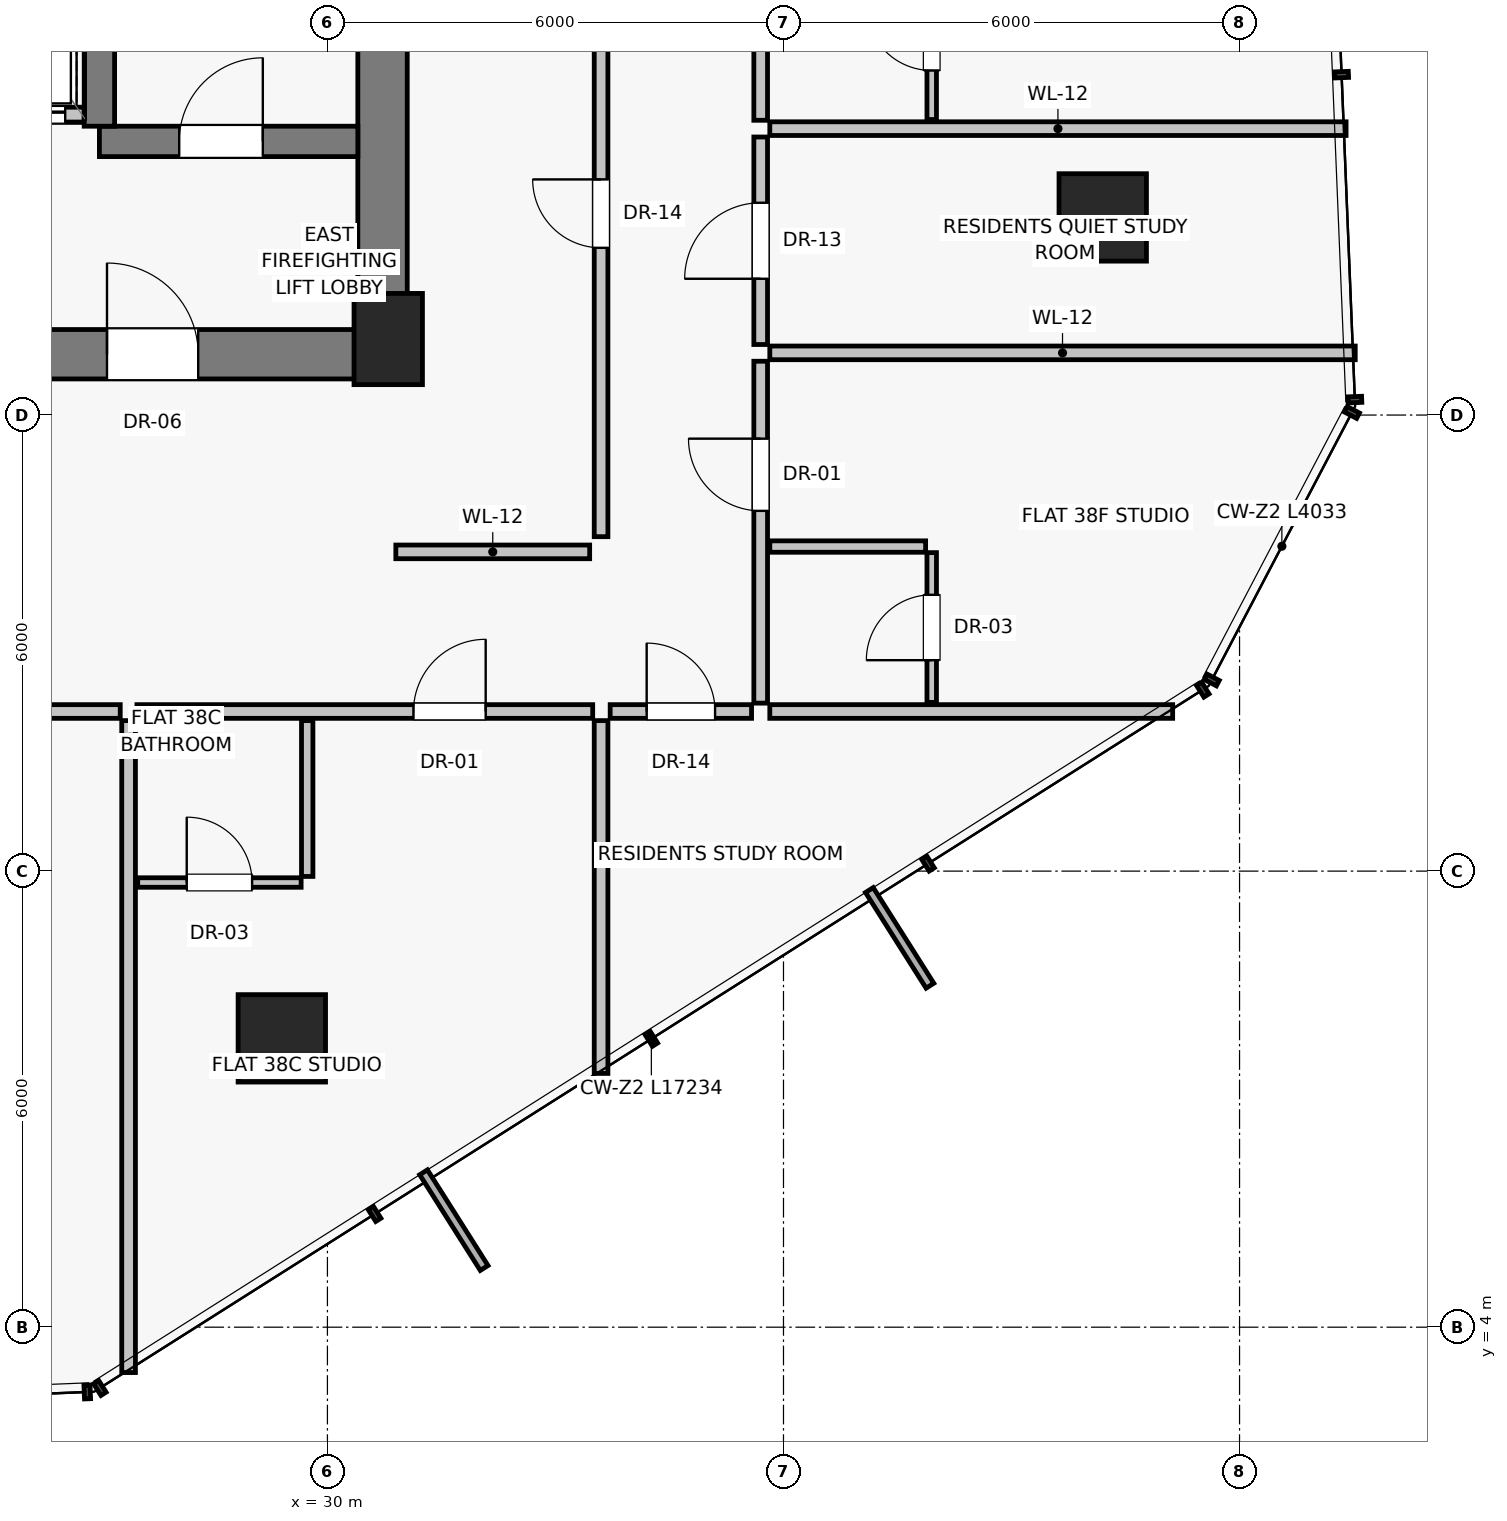
"""IFC4 building model, lengths in metres.
Left out: names, types, materials, properties, quantities, classifications, styles, units other than length and angle.
Written with IfcOpenShell. Run it as: python <this file> out.ifc"""

import sys

from ifc_helpers import new_model, si_unit, direction, frame, frame_2d, origin, origin_2d, place, context, subcontext, project, spatial, rectangle, extrude, source, transform, mapped, element, fill, save


model = new_model("IFC4")
c1 = context("Model", 3, precision=1e-05, world=origin(), true_north=direction((0.0, 1.0)))
c2 = subcontext(c1, "Body", "Model", "MODEL_VIEW")
j1 = project(units=[si_unit("LENGTHUNIT", "METRE"), si_unit("PLANEANGLEUNIT", "RADIAN")], contexts=[c1])
p1 = place(None, origin())
s1 = spatial("IfcSite", under=j1, at=p1, CompositionType="ELEMENT")
p2 = place(p1, origin())
s2 = spatial("IfcBuilding", under=s1, at=p2, CompositionType="ELEMENT")
p3 = place(p2, frame((0.0, 0.0, 136.0)))
s3 = spatial("IfcBuildingStorey", under=s2, at=p3, CompositionType="ELEMENT", Elevation=136.0)
p4 = place(p3, frame((30.8, 17.0, 0.0), z_axis=(0.0, 0.0, 1.0), x_axis=(1.0, 0.0, 0.0)))
e1 = element("IfcColumn", 1, at=p4, inside=s3, PredefinedType="PILASTER", context=c2, shape_type="SweptSolid", body=[
    extrude(rectangle(XDim=0.9, YDim=1.2, at=origin_2d()), origin(), (0.0, 0.0, 1.0), 3.25),
])
for number, where, z_axis, x_axis in (
    (2, (40.2, 18.6, 0.0), (0.0, 0.0, 1.0), (1.0, 0.0, 0.0)),
    (3, (29.4, 7.8, 0.0), (0.0, 0.0, 1.0), (1.0, 0.0, 0.0)),
):
    element("IfcColumn", number, at=place(p3, frame(where, z_axis=z_axis, x_axis=x_axis)), inside=s3, PredefinedType="COLUMN", context=c2, shape_type="SweptSolid", body=[
        extrude(rectangle(XDim=1.15, YDim=1.15, at=origin_2d()), origin(), (0.0, 0.0, 1.0), 3.25),
    ])
p5 = place(p3, frame((30.725, 16.8, 0.0), z_axis=(0.0, 0.0, 1.0), x_axis=(0.0, 1.0, 0.0)))
e4 = element("IfcWall", 4, at=p5, inside=s3, PredefinedType="SHEAR", context=c2, shape_type="SweptSolid", body=[
    extrude(rectangle(XDim=14.2, YDim=0.65, at=frame_2d((7.1, 0.0))), origin(), (0.0, 0.0, 1.0), 3.0),
])
p6 = place(p3, frame((24.95, 16.8, 0.0), z_axis=(0.0, 0.0, 1.0), x_axis=(1.0, 0.0, 0.0)))
e5 = element("IfcWall", 5, at=p6, inside=s3, PredefinedType="SHEAR", context=c2, shape_type="SweptSolid", body=[
    extrude(rectangle(XDim=5.85, YDim=0.65, at=frame_2d((2.925, 0.0))), origin(), (0.0, 0.0, 1.0), 3.0),
])
p7 = place(p6, frame((2.15, 0.0, 0.0)))
e6 = element("IfcOpeningElement", 6, at=p7, cuts=e5, PredefinedType="OPENING", context=c2, shape_type="SweptSolid", body=[
    extrude(rectangle(XDim=1.2, YDim=2.03, at=frame_2d((0.6, 1.015))), frame((0.0, 0.335, 0.0), z_axis=(0.0, -1.0, 0.0), x_axis=(1.0, 0.0, 0.0)), (0.0, 0.0, 1.0), 0.67),
])
p8 = place(p3, frame((24.95, 19.95, 0.0), z_axis=(0.0, 0.0, 1.0), x_axis=(1.0, 0.0, 0.0)))
e7 = element("IfcWall", 7, at=p8, inside=s3, PredefinedType="SOLIDWALL", context=c2, shape_type="SweptSolid", body=[
    extrude(rectangle(XDim=1.85, YDim=0.2, at=frame_2d((0.925, 0.0))), origin(), (0.0, 0.0, 1.0), 3.0),
])
p9 = place(p8, frame((0.3, 0.0, 0.0)))
e8 = element("IfcOpeningElement", 8, at=p9, cuts=e7, PredefinedType="OPENING", context=c2, shape_type="SweptSolid", body=[
    extrude(rectangle(XDim=1.3, YDim=2.25, at=frame_2d((0.65, 1.125))), frame((0.0, 0.11, 0.0), z_axis=(0.0, -1.0, 0.0), x_axis=(1.0, 0.0, 0.0)), (0.0, 0.0, 1.0), 0.22),
])
p10 = place(p3, frame((27.0, 19.6, 0.0), z_axis=(0.0, 0.0, 1.0), x_axis=(1.0, 0.0, 0.0)))
e9 = element("IfcWall", 9, at=p10, inside=s3, PredefinedType="SHEAR", context=c2, shape_type="SweptSolid", body=[
    extrude(rectangle(XDim=3.4, YDim=0.4, at=frame_2d((1.7, 0.0))), origin(), (0.0, 0.0, 1.0), 3.0),
])
p11 = place(p10, frame((1.05, 0.0, 0.0)))
e10 = element("IfcOpeningElement", 10, at=p11, cuts=e9, PredefinedType="OPENING", context=c2, shape_type="SweptSolid", body=[
    extrude(rectangle(XDim=1.1, YDim=2.03, at=frame_2d((0.55, 1.015))), frame((0.0, 0.21, 0.0), z_axis=(0.0, -1.0, 0.0), x_axis=(1.0, 0.0, 0.0)), (0.0, 0.0, 1.0), 0.42),
])
p12 = place(p3, frame((27.0, 19.8, 0.0), z_axis=(0.0, 0.0, 1.0), x_axis=(0.0, 1.0, 0.0)))
e11 = element("IfcWall", 11, at=p12, inside=s3, PredefinedType="SHEAR", context=c2, shape_type="SweptSolid", body=[
    extrude(rectangle(XDim=8.8, YDim=0.4, at=frame_2d((4.4, 0.0))), origin(), (0.0, 0.0, 1.0), 3.0),
])
p13 = place(p3, frame((33.6, 14.4, 0.0), z_axis=(0.0, 0.0, 1.0), x_axis=(0.0, 1.0, 0.0)))
e12 = element("IfcWall", 12, at=p13, inside=s3, PredefinedType="PARTITIONING", context=c2, shape_type="SweptSolid", body=[
    extrude(rectangle(XDim=9.4, YDim=0.18, at=frame_2d((4.7, 0.0))), origin(), (0.0, 0.0, 1.0), 3.0),
])
p14 = place(p13, frame((3.8, 0.0, 0.0)))
e13 = element("IfcOpeningElement", 13, at=p14, cuts=e12, PredefinedType="OPENING", context=c2, shape_type="SweptSolid", body=[
    extrude(rectangle(XDim=0.9, YDim=2.01, at=frame_2d((0.45, 1.005))), frame((0.0, 0.1, 0.0), z_axis=(0.0, -1.0, 0.0), x_axis=(1.0, 0.0, 0.0)), (0.0, 0.0, 1.0), 0.2),
])
p15 = place(p3, frame((30.9, 14.2, 0.0), z_axis=(0.0, 0.0, 1.0), x_axis=(1.0, 0.0, 0.0)))
e14 = element("IfcWall", 14, at=p15, inside=s3, PredefinedType="PARTITIONING", context=c2, shape_type="SweptSolid", body=[
    extrude(rectangle(XDim=2.55, YDim=0.18, at=frame_2d((1.275, 0.0))), origin(), (0.0, 0.0, 1.0), 3.0),
])
p16 = place(p3, frame((33.6, 11.98, 0.0), z_axis=(0.0, 0.0, 1.0), x_axis=(0.0, -1.0, 0.0)))
e15 = element("IfcWall", 15, at=p16, inside=s3, PredefinedType="PARTITIONING", context=c2, shape_type="SweptSolid", body=[
    extrude(rectangle(XDim=4.641, YDim=0.18, at=frame_2d((2.321, 0.0))), origin(), (0.0, 0.0, 1.0), 3.0),
])
p17 = place(p3, frame((20.726, 12.1, 0.0), z_axis=(0.0, 0.0, 1.0), x_axis=(1.0, 0.0, 0.0)))
e16 = element("IfcWall", 16, at=p17, inside=s3, PredefinedType="PARTITIONING", context=c2, shape_type="SweptSolid", body=[
    extrude(rectangle(XDim=6.548, YDim=0.18, at=frame_2d((3.274, 0.0))), origin(), (0.0, 0.0, 1.0), 2.58),
])
p18 = place(p17, frame((4.046, 0.0, 0.0)))
e17 = element("IfcOpeningElement", 17, at=p18, cuts=e16, PredefinedType="OPENING", context=c2, shape_type="SweptSolid", body=[
    extrude(rectangle(XDim=0.95, YDim=2.02, at=frame_2d((0.475, 1.01))), frame((0.0, 0.1, 0.0), z_axis=(0.0, -1.0, 0.0), x_axis=(1.0, 0.0, 0.0)), (0.0, 0.0, 1.0), 0.2),
])
p19 = place(p3, frame((27.384, 11.98, 0.0), z_axis=(0.0, 0.0, 1.0), x_axis=(0.0, -1.0, 0.0)))
e18 = element("IfcWall", 18, at=p19, inside=s3, PredefinedType="PARTITIONING", context=c2, shape_type="SweptSolid", body=[
    extrude(rectangle(XDim=8.577, YDim=0.18, at=frame_2d((4.289, 0.0))), origin(), (0.0, 0.0, 1.0), 3.0),
])
p20 = place(p3, frame((27.494, 12.1, 0.0), z_axis=(0.0, 0.0, 1.0), x_axis=(1.0, 0.0, 0.0)))
e19 = element("IfcWall", 19, at=p20, inside=s3, PredefinedType="PARTITIONING", context=c2, shape_type="SweptSolid", body=[
    extrude(rectangle(XDim=5.996, YDim=0.18, at=frame_2d((2.998, 0.0))), origin(), (0.0, 0.0, 1.0), 2.58),
])
p21 = place(p20, frame((3.638, 0.0, 0.0)))
e20 = element("IfcOpeningElement", 20, at=p21, cuts=e19, PredefinedType="OPENING", context=c2, shape_type="SweptSolid", body=[
    extrude(rectangle(XDim=0.95, YDim=2.02, at=frame_2d((0.475, 1.01))), frame((0.0, 0.1, 0.0), z_axis=(0.0, -1.0, 0.0), x_axis=(1.0, 0.0, 0.0)), (0.0, 0.0, 1.0), 0.2),
])
p22 = place(p3, frame((29.734, 11.98, 0.0), z_axis=(0.0, 0.0, 1.0), x_axis=(0.0, -1.0, 0.0)))
e21 = element("IfcWall", 21, at=p22, inside=s3, PredefinedType="PARTITIONING", context=c2, shape_type="SweptSolid", body=[
    extrude(rectangle(XDim=2.05, YDim=0.15, at=frame_2d((1.025, 0.0))), origin(), (0.0, 0.0, 1.0), 2.378),
])
p23 = place(p3, frame((27.504, 9.85, 0.0), z_axis=(0.0, 0.0, 1.0), x_axis=(1.0, 0.0, 0.0)))
e22 = element("IfcWall", 22, at=p23, inside=s3, PredefinedType="PARTITIONING", context=c2, shape_type="SweptSolid", body=[
    extrude(rectangle(XDim=2.15, YDim=0.125, at=frame_2d((1.075, 0.0))), origin(), (0.0, 0.0, 1.0), 3.0),
])
p24 = place(p23, frame((0.645, 0.0, 0.0)))
e23 = element("IfcOpeningElement", 23, at=p24, cuts=e22, PredefinedType="OPENING", context=c2, shape_type="SweptSolid", body=[
    extrude(rectangle(XDim=0.86, YDim=2.01, at=frame_2d((0.43, 1.005))), frame((0.0, 0.073, 0.0), z_axis=(0.0, -1.0, 0.0), x_axis=(1.0, 0.0, 0.0)), (0.0, 0.0, 1.0), 0.145),
])
p25 = place(p3, frame((35.82, 12.1, 0.0), z_axis=(0.0, 0.0, 1.0), x_axis=(1.0, 0.0, 0.0)))
e24 = element("IfcWall", 24, at=p25, inside=s3, PredefinedType="PARTITIONING", context=c2, shape_type="SweptSolid", body=[
    extrude(rectangle(XDim=5.3, YDim=0.18, at=frame_2d((2.65, 0.0))), origin(), (0.0, 0.0, 1.0), 3.0),
])
p26 = place(p3, frame((35.7, 16.928, 0.0), z_axis=(0.0, 0.0, 1.0), x_axis=(0.0, 1.0, 0.0)))
e25 = element("IfcWall", 25, at=p26, inside=s3, PredefinedType="PARTITIONING", context=c2, shape_type="SweptSolid", body=[
    extrude(rectangle(XDim=2.73, YDim=0.18, at=frame_2d((1.365, 0.0))), origin(), (0.0, 0.0, 1.0), 2.58),
])
p27 = place(p26, frame((0.865, 0.0, 0.0)))
e26 = element("IfcOpeningElement", 26, at=p27, cuts=e25, PredefinedType="OPENING", context=c2, shape_type="SweptSolid", body=[
    extrude(rectangle(XDim=1.0, YDim=2.01, at=frame_2d((0.5, 1.005))), frame((0.0, 0.1, 0.0), z_axis=(0.0, -1.0, 0.0), x_axis=(1.0, 0.0, 0.0)), (0.0, 0.0, 1.0), 0.2),
])
p28 = place(p3, frame((35.82, 16.818, 0.0), z_axis=(0.0, 0.0, 1.0), x_axis=(1.0, 0.0, 0.0)))
e27 = element("IfcWall", 27, at=p28, inside=s3, PredefinedType="PARTITIONING", context=c2, shape_type="SweptSolid", body=[
    extrude(rectangle(XDim=7.702, YDim=0.18, at=frame_2d((3.851, 0.0))), origin(), (0.0, 0.0, 1.0), 3.0),
])
p29 = place(p3, frame((35.7, 12.21, 0.0), z_axis=(0.0, 0.0, 1.0), x_axis=(0.0, 1.0, 0.0)))
e28 = element("IfcWall", 28, at=p29, inside=s3, PredefinedType="PARTITIONING", context=c2, shape_type="SweptSolid", body=[
    extrude(rectangle(XDim=4.498, YDim=0.18, at=frame_2d((2.249, 0.0))), origin(), (0.0, 0.0, 1.0), 3.0),
])
p30 = place(p29, frame((2.53, 0.0, 0.0)))
e29 = element("IfcOpeningElement", 29, at=p30, cuts=e28, PredefinedType="OPENING", context=c2, shape_type="SweptSolid", body=[
    extrude(rectangle(XDim=0.95, YDim=2.02, at=frame_2d((0.475, 1.01))), frame((0.0, 0.1, 0.0), z_axis=(0.0, -1.0, 0.0), x_axis=(1.0, 0.0, 0.0)), (0.0, 0.0, 1.0), 0.2),
])
p31 = place(p3, frame((35.82, 14.27, 0.0), z_axis=(0.0, 0.0, 1.0), x_axis=(1.0, 0.0, 0.0)))
e30 = element("IfcWall", 30, at=p31, inside=s3, PredefinedType="PARTITIONING", context=c2, shape_type="SweptSolid", body=[
    extrude(rectangle(XDim=2.05, YDim=0.15, at=frame_2d((1.025, 0.0))), origin(), (0.0, 0.0, 1.0), 3.0),
])
p32 = place(p3, frame((37.95, 12.22, 0.0), z_axis=(0.0, 0.0, 1.0), x_axis=(0.0, 1.0, 0.0)))
e31 = element("IfcWall", 31, at=p32, inside=s3, PredefinedType="PARTITIONING", context=c2, shape_type="SweptSolid", body=[
    extrude(rectangle(XDim=1.97, YDim=0.125, at=frame_2d((0.985, 0.0))), origin(), (0.0, 0.0, 1.0), 3.0),
])
p33 = place(p32, frame((0.555, 0.0, 0.0)))
e32 = element("IfcOpeningElement", 32, at=p33, cuts=e31, PredefinedType="OPENING", context=c2, shape_type="SweptSolid", body=[
    extrude(rectangle(XDim=0.86, YDim=2.01, at=frame_2d((0.43, 1.005))), frame((0.0, 0.073, 0.0), z_axis=(0.0, -1.0, 0.0), x_axis=(1.0, 0.0, 0.0)), (0.0, 0.0, 1.0), 0.145),
])
p34 = place(p3, frame((35.82, 19.768, 0.0), z_axis=(0.0, 0.0, 1.0), x_axis=(1.0, 0.0, 0.0)))
e33 = element("IfcWall", 33, at=p34, inside=s3, PredefinedType="PARTITIONING", context=c2, shape_type="SweptSolid", body=[
    extrude(rectangle(XDim=7.582, YDim=0.18, at=frame_2d((3.791, 0.0))), origin(), (0.0, 0.0, 1.0), 3.0),
])
p35 = place(p3, frame((35.7, 19.878, 0.0), z_axis=(0.0, 0.0, 1.0), x_axis=(0.0, 1.0, 0.0)))
e34 = element("IfcWall", 34, at=p35, inside=s3, PredefinedType="PARTITIONING", context=c2, shape_type="SweptSolid", body=[
    extrude(rectangle(XDim=5.094, YDim=0.18, at=frame_2d((2.547, 0.0))), origin(), (0.0, 0.0, 1.0), 2.58),
])
p36 = place(p35, frame((2.971, 0.0, 0.0)))
e35 = element("IfcOpeningElement", 35, at=p36, cuts=e34, PredefinedType="OPENING", context=c2, shape_type="SweptSolid", body=[
    extrude(rectangle(XDim=0.95, YDim=2.02, at=frame_2d((0.475, 1.01))), frame((0.0, 0.1, 0.0), z_axis=(0.0, -1.0, 0.0), x_axis=(1.0, 0.0, 0.0)), (0.0, 0.0, 1.0), 0.2),
])
p37 = place(p3, frame((37.95, 19.888, 0.0), z_axis=(0.0, 0.0, 1.0), x_axis=(0.0, 1.0, 0.0)))
e36 = element("IfcWall", 36, at=p37, inside=s3, PredefinedType="PARTITIONING", context=c2, shape_type="SweptSolid", body=[
    extrude(rectangle(XDim=2.15, YDim=0.125, at=frame_2d((1.075, 0.0))), origin(), (0.0, 0.0, 1.0), 3.0),
])
p38 = place(p37, frame((0.645, 0.0, 0.0)))
e37 = element("IfcOpeningElement", 37, at=p38, cuts=e36, PredefinedType="OPENING", context=c2, shape_type="SweptSolid", body=[
    extrude(rectangle(XDim=0.86, YDim=2.01, at=frame_2d((0.43, 1.005))), frame((0.0, 0.073, 0.0), z_axis=(0.0, -1.0, 0.0), x_axis=(1.0, 0.0, 0.0)), (0.0, 0.0, 1.0), 0.145),
])
p39 = place(p3, frame((33.72, 12.1, 0.0), z_axis=(0.0, 0.0, 1.0), x_axis=(1.0, 0.0, 0.0)))
e38 = element("IfcWall", 38, at=p39, inside=s3, PredefinedType="PARTITIONING", context=c2, shape_type="SweptSolid", body=[
    extrude(rectangle(XDim=1.86, YDim=0.18, at=frame_2d((0.93, 0.0))), origin(), (0.0, 0.0, 1.0), 3.0),
])
p40 = place(p39, frame((0.48, 0.0, 0.0)))
e39 = element("IfcOpeningElement", 39, at=p40, cuts=e38, PredefinedType="OPENING", context=c2, shape_type="SweptSolid", body=[
    extrude(rectangle(XDim=0.9, YDim=2.01, at=frame_2d((0.45, 1.005))), frame((0.0, 0.1, 0.0), z_axis=(0.0, -1.0, 0.0), x_axis=(1.0, 0.0, 0.0)), (0.0, 0.0, 1.0), 0.2),
])
m1 = source(origin(), c2, "Body", "SweptSolid", [
    extrude(rectangle(XDim=1.2, YDim=2.03, at=frame_2d((0.6, 1.015))), frame((0.0, 0.025, 0.0), z_axis=(0.0, -1.0, 0.0), x_axis=(1.0, 0.0, 0.0)), (0.0, 0.0, 1.0), 0.05),
])
p41 = place(p7, origin())
e40 = element("IfcDoor", 40, at=p41, inside=s3, OperationType="SINGLE_SWING_LEFT", PredefinedType="DOOR", context=c2, shape_type="MappedRepresentation", body=[
    mapped(m1, transform((0.0, 0.0, 0.0), scale=1.0)),
])
fill(e6, e40)
m2 = source(origin(), c2, "Body", "SweptSolid", [
    extrude(rectangle(XDim=1.3, YDim=2.25, at=frame_2d((0.65, 1.125))), frame((0.0, 0.025, 0.0), z_axis=(0.0, -1.0, 0.0), x_axis=(1.0, 0.0, 0.0)), (0.0, 0.0, 1.0), 0.05),
])
p42 = place(p9, origin())
e41 = element("IfcDoor", 41, at=p42, inside=s3, OperationType="SLIDING_TO_LEFT", PredefinedType="DOOR", context=c2, shape_type="MappedRepresentation", body=[
    mapped(m2, transform((0.0, 0.0, 0.0), scale=1.0)),
])
fill(e8, e41)
m3 = source(origin(), c2, "Body", "SweptSolid", [
    extrude(rectangle(XDim=1.1, YDim=2.03, at=frame_2d((0.55, 1.015))), frame((0.0, 0.025, 0.0), z_axis=(0.0, -1.0, 0.0), x_axis=(1.0, 0.0, 0.0)), (0.0, 0.0, 1.0), 0.05),
])
p43 = place(p11, origin())
e42 = element("IfcDoor", 42, at=p43, inside=s3, OperationType="SINGLE_SWING_RIGHT", PredefinedType="DOOR", context=c2, shape_type="MappedRepresentation", body=[
    mapped(m3, transform((0.0, 0.0, 0.0), scale=1.0)),
])
fill(e10, e42)
m4 = source(origin(), c2, "Body", "SweptSolid", [
    extrude(rectangle(XDim=0.9, YDim=2.01, at=frame_2d((0.45, 1.005))), frame((0.0, 0.025, 0.0), z_axis=(0.0, -1.0, 0.0), x_axis=(1.0, 0.0, 0.0)), (0.0, 0.0, 1.0), 0.05),
])
p44 = place(p14, origin())
e43 = element("IfcDoor", 43, at=p44, inside=s3, OperationType="SINGLE_SWING_RIGHT", PredefinedType="DOOR", context=c2, shape_type="MappedRepresentation", body=[
    mapped(m4, transform((0.0, 0.0, 0.0), scale=1.0)),
])
fill(e13, e43)
m5 = source(origin(), c2, "Body", "SweptSolid", [
    extrude(rectangle(XDim=0.95, YDim=2.02, at=frame_2d((0.475, 1.01))), frame((0.0, 0.025, 0.0), z_axis=(0.0, -1.0, 0.0), x_axis=(1.0, 0.0, 0.0)), (0.0, 0.0, 1.0), 0.05),
])
p45 = place(p21, origin())
e44 = element("IfcDoor", 44, at=p45, inside=s3, OperationType="SINGLE_SWING_RIGHT", PredefinedType="DOOR", context=c2, shape_type="MappedRepresentation", body=[
    mapped(m5, transform((0.0, 0.0, 0.0), scale=1.0)),
])
fill(e20, e44)
m6 = source(origin(), c2, "Body", "SweptSolid", [
    extrude(rectangle(XDim=0.86, YDim=2.01, at=frame_2d((0.43, 1.005))), frame((0.0, 0.025, 0.0), z_axis=(0.0, -1.0, 0.0), x_axis=(1.0, 0.0, 0.0)), (0.0, 0.0, 1.0), 0.05),
])
p46 = place(p24, origin())
e45 = element("IfcDoor", 45, at=p46, inside=s3, OperationType="SINGLE_SWING_LEFT", PredefinedType="DOOR", context=c2, shape_type="MappedRepresentation", body=[
    mapped(m6, transform((0.0, 0.0, 0.0), scale=1.0)),
])
fill(e23, e45)
m7 = source(origin(), c2, "Body", "SweptSolid", [
    extrude(rectangle(XDim=1.0, YDim=2.01, at=frame_2d((0.5, 1.005))), frame((0.0, 0.025, 0.0), z_axis=(0.0, -1.0, 0.0), x_axis=(1.0, 0.0, 0.0)), (0.0, 0.0, 1.0), 0.05),
])
p47 = place(p27, origin())
e46 = element("IfcDoor", 46, at=p47, inside=s3, OperationType="SINGLE_SWING_LEFT", PredefinedType="DOOR", context=c2, shape_type="MappedRepresentation", body=[
    mapped(m7, transform((0.0, 0.0, 0.0), scale=1.0)),
])
fill(e26, e46)
p48 = place(p30, origin())
e47 = element("IfcDoor", 47, at=p48, inside=s3, OperationType="SINGLE_SWING_RIGHT", PredefinedType="DOOR", context=c2, shape_type="MappedRepresentation", body=[
    mapped(m5, transform((0.0, 0.0, 0.0), scale=1.0)),
])
fill(e29, e47)
p49 = place(p33, origin())
e48 = element("IfcDoor", 48, at=p49, inside=s3, OperationType="SINGLE_SWING_LEFT", PredefinedType="DOOR", context=c2, shape_type="MappedRepresentation", body=[
    mapped(m6, transform((0.0, 0.0, 0.0), scale=1.0)),
])
fill(e32, e48)
p50 = place(p38, origin())
e49 = element("IfcDoor", 49, at=p50, inside=s3, OperationType="SINGLE_SWING_RIGHT", PredefinedType="DOOR", context=c2, shape_type="MappedRepresentation", body=[
    mapped(m6, transform((0.0, 0.0, 0.0), scale=1.0)),
])
fill(e37, e49)
p51 = place(p40, origin())
e50 = element("IfcDoor", 50, at=p51, inside=s3, OperationType="SINGLE_SWING_LEFT", PredefinedType="DOOR", context=c2, shape_type="MappedRepresentation", body=[
    mapped(m4, transform((0.0, 0.0, 0.0), scale=1.0)),
])
fill(e39, e50)
save(model, sys.argv[1])
